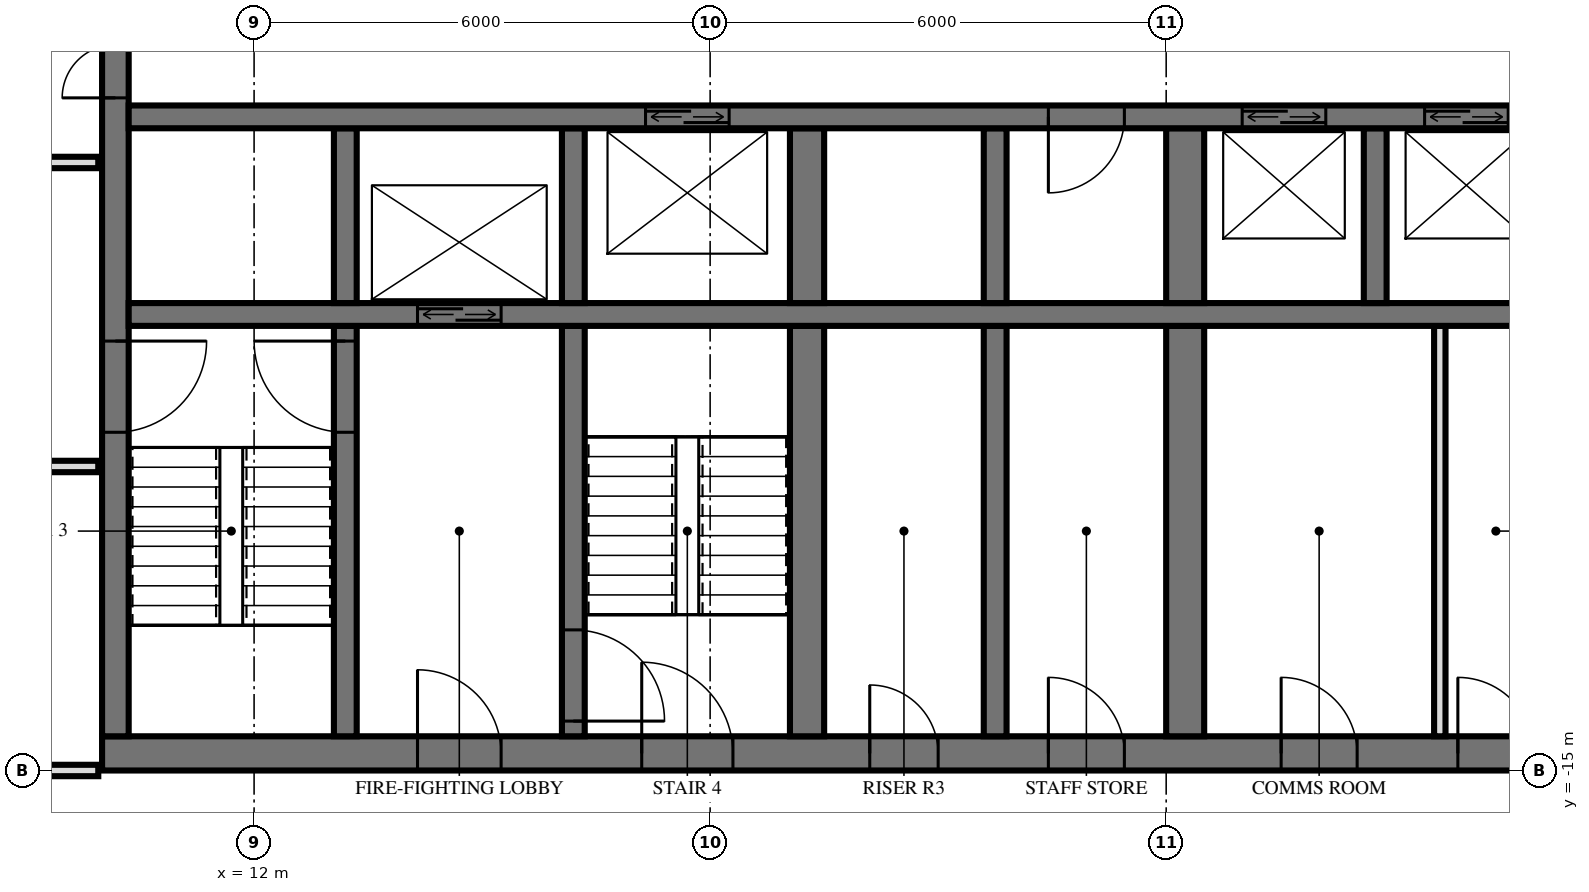
"""IFC4 building model, lengths in metres.
Left out: names, types, materials, properties, quantities, classifications, styles, units other than length and angle.
Written with IfcOpenShell. Run it as: python <this file> out.ifc"""

import sys

from ifc_helpers import new_model, si_unit, direction, frame, frame_2d, origin, place, context, subcontext, project, spatial, rectangle, extrude, element, fill, save


model = new_model("IFC4")
c1 = context("Model", 3, precision=1e-05, world=origin(), true_north=direction((0.0, 1.0)))
c2 = subcontext(c1, "Body", "Model", "MODEL_VIEW")
j1 = project(units=[si_unit("LENGTHUNIT", "METRE"), si_unit("PLANEANGLEUNIT", "RADIAN")], contexts=[c1])
p1 = place(None, origin())
s1 = spatial("IfcSite", under=j1, at=p1, CompositionType="ELEMENT")
p2 = place(p1, origin())
s2 = spatial("IfcBuilding", under=s1, at=p2, CompositionType="ELEMENT")
p3 = place(p2, frame((0.0, 0.0, 81.6)))
s3 = spatial("IfcBuildingStorey", under=s2, at=p3, CompositionType="ELEMENT", Elevation=81.6)
p4 = place(p3, frame((10.0, -14.775, 0.0), z_axis=(0.0, 0.0, 1.0), x_axis=(1.0, 0.0, 0.0)))
e1 = element("IfcWall", 1, at=p4, inside=s3, PredefinedType="SHEAR", context=c2, shape_type="SweptSolid", body=[
    extrude(rectangle(XDim=19.5, YDim=0.45, at=frame_2d((9.75, 0.0))), origin(), (0.0, 0.0, 1.0), 3.6),
])
p5 = place(p4, frame((7.1, 0.0, 0.0)))
e2 = element("IfcOpeningElement", 2, at=p5, cuts=e1, PredefinedType="OPENING", context=c2, shape_type="SweptSolid", body=[
    extrude(rectangle(XDim=1.2, YDim=2.1, at=frame_2d((0.6, 1.05))), frame((0.0, 0.235, 0.0), z_axis=(0.0, -1.0, 0.0), x_axis=(1.0, 0.0, 0.0)), (0.0, 0.0, 1.0), 0.47),
])
p6 = place(p4, frame((4.15, 0.0, 0.0)))
e3 = element("IfcOpeningElement", 3, at=p6, cuts=e1, PredefinedType="OPENING", context=c2, shape_type="SweptSolid", body=[
    extrude(rectangle(XDim=1.1, YDim=2.1, at=frame_2d((0.55, 1.05))), frame((0.0, 0.235, 0.0), z_axis=(0.0, -1.0, 0.0), x_axis=(1.0, 0.0, 0.0)), (0.0, 0.0, 1.0), 0.47),
])
p7 = place(p4, frame((10.1, 0.0, 0.0)))
e4 = element("IfcOpeningElement", 4, at=p7, cuts=e1, PredefinedType="OPENING", context=c2, shape_type="SweptSolid", body=[
    extrude(rectangle(XDim=0.9, YDim=2.1, at=frame_2d((0.45, 1.05))), frame((0.0, 0.235, 0.0), z_axis=(0.0, -1.0, 0.0), x_axis=(1.0, 0.0, 0.0)), (0.0, 0.0, 1.0), 0.47),
])
p8 = place(p4, frame((12.45, 0.0, 0.0)))
e5 = element("IfcOpeningElement", 5, at=p8, cuts=e1, PredefinedType="OPENING", context=c2, shape_type="SweptSolid", body=[
    extrude(rectangle(XDim=1.0, YDim=2.1, at=frame_2d((0.5, 1.05))), frame((0.0, 0.235, 0.0), z_axis=(0.0, -1.0, 0.0), x_axis=(1.0, 0.0, 0.0)), (0.0, 0.0, 1.0), 0.47),
])
p9 = place(p4, frame((15.512, 0.0, 0.0)))
e6 = element("IfcOpeningElement", 6, at=p9, cuts=e1, PredefinedType="OPENING", context=c2, shape_type="SweptSolid", body=[
    extrude(rectangle(XDim=1.0, YDim=2.1, at=frame_2d((0.5, 1.05))), frame((0.0, 0.235, 0.0), z_axis=(0.0, -1.0, 0.0), x_axis=(1.0, 0.0, 0.0)), (0.0, 0.0, 1.0), 0.47),
])
p10 = place(p4, frame((17.837, 0.0, 0.0)))
e7 = element("IfcOpeningElement", 7, at=p10, cuts=e1, PredefinedType="OPENING", context=c2, shape_type="SweptSolid", body=[
    extrude(rectangle(XDim=1.0, YDim=2.1, at=frame_2d((0.5, 1.05))), frame((0.0, 0.235, 0.0), z_axis=(0.0, -1.0, 0.0), x_axis=(1.0, 0.0, 0.0)), (0.0, 0.0, 1.0), 0.47),
])
p11 = place(p3, frame((10.175, -14.55, 0.0), z_axis=(0.0, 0.0, 1.0), x_axis=(0.0, 1.0, 0.0)))
e8 = element("IfcWall", 8, at=p11, inside=s3, PredefinedType="SHEAR", context=c2, shape_type="SweptSolid", body=[
    extrude(rectangle(XDim=14.1, YDim=0.35, at=frame_2d((7.05, 0.0))), origin(), (0.0, 0.0, 1.0), 3.6),
])
p12 = place(p11, frame((8.4, 0.0, 0.0)))
e9 = element("IfcOpeningElement", 9, at=p12, cuts=e8, PredefinedType="OPENING", context=c2, shape_type="SweptSolid", body=[
    extrude(rectangle(XDim=1.4, YDim=2.4, at=frame_2d((0.7, 1.2))), frame((0.0, 0.185, 0.0), z_axis=(0.0, -1.0, 0.0), x_axis=(1.0, 0.0, 0.0)), (0.0, 0.0, 1.0), 0.37),
])
p13 = place(p11, frame((10.0, 0.0, 0.0)))
e10 = element("IfcOpeningElement", 10, at=p13, cuts=e8, PredefinedType="OPENING", context=c2, shape_type="SweptSolid", body=[
    extrude(rectangle(XDim=1.4, YDim=2.4, at=frame_2d((0.7, 1.2))), frame((0.0, 0.185, 0.0), z_axis=(0.0, -1.0, 0.0), x_axis=(1.0, 0.0, 0.0)), (0.0, 0.0, 1.0), 0.37),
])
p14 = place(p11, frame((4.0, 0.0, 0.0)))
e11 = element("IfcOpeningElement", 11, at=p14, cuts=e8, PredefinedType="OPENING", context=c2, shape_type="SweptSolid", body=[
    extrude(rectangle(XDim=1.2, YDim=2.1, at=frame_2d((0.6, 1.05))), frame((0.0, 0.185, 0.0), z_axis=(0.0, -1.0, 0.0), x_axis=(1.0, 0.0, 0.0)), (0.0, 0.0, 1.0), 0.37),
])
p15 = place(p3, frame((10.35, -6.4, 0.0), z_axis=(0.0, 0.0, 1.0), x_axis=(1.0, 0.0, 0.0)))
e12 = element("IfcWall", 12, at=p15, inside=s3, PredefinedType="SHEAR", context=c2, shape_type="SweptSolid", body=[
    extrude(rectangle(XDim=18.7, YDim=0.3, at=frame_2d((9.35, 0.0))), origin(), (0.0, 0.0, 1.0), 3.6),
])
p16 = place(p15, frame((14.65, 0.0, 0.0)))
e13 = element("IfcOpeningElement", 13, at=p16, cuts=e12, PredefinedType="OPENING", context=c2, shape_type="SweptSolid", body=[
    extrude(rectangle(XDim=1.1, YDim=2.1, at=frame_2d((0.55, 1.05))), frame((0.0, 0.16, 0.0), z_axis=(0.0, -1.0, 0.0), x_axis=(1.0, 0.0, 0.0)), (0.0, 0.0, 1.0), 0.32),
])
p17 = place(p15, frame((17.05, 0.0, 0.0)))
e14 = element("IfcOpeningElement", 14, at=p17, cuts=e12, PredefinedType="OPENING", context=c2, shape_type="SweptSolid", body=[
    extrude(rectangle(XDim=1.1, YDim=2.1, at=frame_2d((0.55, 1.05))), frame((0.0, 0.16, 0.0), z_axis=(0.0, -1.0, 0.0), x_axis=(1.0, 0.0, 0.0)), (0.0, 0.0, 1.0), 0.32),
])
p18 = place(p15, frame((6.8, 0.0, 0.0)))
e15 = element("IfcOpeningElement", 15, at=p18, cuts=e12, PredefinedType="OPENING", context=c2, shape_type="SweptSolid", body=[
    extrude(rectangle(XDim=1.1, YDim=2.1, at=frame_2d((0.55, 1.05))), frame((0.0, 0.16, 0.0), z_axis=(0.0, -1.0, 0.0), x_axis=(1.0, 0.0, 0.0)), (0.0, 0.0, 1.0), 0.32),
])
p19 = place(p15, frame((12.1, 0.0, 0.0)))
e16 = element("IfcOpeningElement", 16, at=p19, cuts=e12, PredefinedType="OPENING", context=c2, shape_type="SweptSolid", body=[
    extrude(rectangle(XDim=1.0, YDim=2.1, at=frame_2d((0.5, 1.05))), frame((0.0, 0.16, 0.0), z_axis=(0.0, -1.0, 0.0), x_axis=(1.0, 0.0, 0.0)), (0.0, 0.0, 1.0), 0.32),
])
p20 = place(p3, frame((10.35, -9.0, 0.0), z_axis=(0.0, 0.0, 1.0), x_axis=(1.0, 0.0, 0.0)))
e17 = element("IfcWall", 17, at=p20, inside=s3, PredefinedType="SHEAR", context=c2, shape_type="SweptSolid", body=[
    extrude(rectangle(XDim=18.7, YDim=0.3, at=frame_2d((9.35, 0.0))), origin(), (0.0, 0.0, 1.0), 3.6),
])
p21 = place(p20, frame((3.8, 0.0, 0.0)))
e18 = element("IfcOpeningElement", 18, at=p21, cuts=e17, PredefinedType="OPENING", context=c2, shape_type="SweptSolid", body=[
    extrude(rectangle(XDim=1.1, YDim=2.1, at=frame_2d((0.55, 1.05))), frame((0.0, 0.16, 0.0), z_axis=(0.0, -1.0, 0.0), x_axis=(1.0, 0.0, 0.0)), (0.0, 0.0, 1.0), 0.32),
])
p22 = place(p3, frame((13.2, -8.85, 0.0), z_axis=(0.0, 0.0, 1.0), x_axis=(0.0, 1.0, 0.0)))
e19 = element("IfcWall", 19, at=p22, inside=s3, PredefinedType="SHEAR", context=c2, shape_type="SweptSolid", body=[
    extrude(rectangle(XDim=2.3, YDim=0.3, at=frame_2d((1.15, 0.0))), origin(), (0.0, 0.0, 1.0), 3.6),
])
p23 = place(p3, frame((13.2, -14.55, 0.0), z_axis=(0.0, 0.0, 1.0), x_axis=(0.0, 1.0, 0.0)))
e20 = element("IfcWall", 20, at=p23, inside=s3, PredefinedType="SHEAR", context=c2, shape_type="SweptSolid", body=[
    extrude(rectangle(XDim=5.4, YDim=0.3, at=frame_2d((2.7, 0.0))), origin(), (0.0, 0.0, 1.0), 3.6),
])
p24 = place(p23, frame((4.0, 0.0, 0.0)))
e21 = element("IfcOpeningElement", 21, at=p24, cuts=e20, PredefinedType="OPENING", context=c2, shape_type="SweptSolid", body=[
    extrude(rectangle(XDim=1.2, YDim=2.1, at=frame_2d((0.6, 1.05))), frame((0.0, 0.16, 0.0), z_axis=(0.0, -1.0, 0.0), x_axis=(1.0, 0.0, 0.0)), (0.0, 0.0, 1.0), 0.32),
])
p25 = place(p3, frame((16.2, -8.85, 0.0), z_axis=(0.0, 0.0, 1.0), x_axis=(0.0, 1.0, 0.0)))
e22 = element("IfcWall", 22, at=p25, inside=s3, PredefinedType="SHEAR", context=c2, shape_type="SweptSolid", body=[
    extrude(rectangle(XDim=2.3, YDim=0.3, at=frame_2d((1.15, 0.0))), origin(), (0.0, 0.0, 1.0), 3.6),
])
p26 = place(p3, frame((16.2, -14.55, 0.0), z_axis=(0.0, 0.0, 1.0), x_axis=(0.0, 1.0, 0.0)))
e23 = element("IfcWall", 23, at=p26, inside=s3, PredefinedType="SHEAR", context=c2, shape_type="SweptSolid", body=[
    extrude(rectangle(XDim=5.4, YDim=0.3, at=frame_2d((2.7, 0.0))), origin(), (0.0, 0.0, 1.0), 3.6),
])
p27 = place(p26, frame((0.2, 0.0, 0.0)))
e24 = element("IfcOpeningElement", 24, at=p27, cuts=e23, PredefinedType="OPENING", context=c2, shape_type="SweptSolid", body=[
    extrude(rectangle(XDim=1.2, YDim=2.1, at=frame_2d((0.6, 1.05))), frame((0.0, 0.16, 0.0), z_axis=(0.0, -1.0, 0.0), x_axis=(1.0, 0.0, 0.0)), (0.0, 0.0, 1.0), 0.32),
])
p28 = place(p3, frame((19.275, -8.85, 0.0), z_axis=(0.0, 0.0, 1.0), x_axis=(0.0, 1.0, 0.0)))
e25 = element("IfcWall", 25, at=p28, inside=s3, PredefinedType="SHEAR", context=c2, shape_type="SweptSolid", body=[
    extrude(rectangle(XDim=2.3, YDim=0.45, at=frame_2d((1.15, 0.0))), origin(), (0.0, 0.0, 1.0), 3.6),
])
p29 = place(p3, frame((19.275, -14.55, 0.0), z_axis=(0.0, 0.0, 1.0), x_axis=(0.0, 1.0, 0.0)))
e26 = element("IfcWall", 26, at=p29, inside=s3, PredefinedType="SHEAR", context=c2, shape_type="SweptSolid", body=[
    extrude(rectangle(XDim=5.4, YDim=0.45, at=frame_2d((2.7, 0.0))), origin(), (0.0, 0.0, 1.0), 3.6),
])
p30 = place(p3, frame((21.75, -8.85, 0.0), z_axis=(0.0, 0.0, 1.0), x_axis=(0.0, 1.0, 0.0)))
e27 = element("IfcWall", 27, at=p30, inside=s3, PredefinedType="SHEAR", context=c2, shape_type="SweptSolid", body=[
    extrude(rectangle(XDim=2.3, YDim=0.3, at=frame_2d((1.15, 0.0))), origin(), (0.0, 0.0, 1.0), 3.6),
])
p31 = place(p3, frame((21.75, -14.55, 0.0), z_axis=(0.0, 0.0, 1.0), x_axis=(0.0, 1.0, 0.0)))
e28 = element("IfcWall", 28, at=p31, inside=s3, PredefinedType="SHEAR", context=c2, shape_type="SweptSolid", body=[
    extrude(rectangle(XDim=5.4, YDim=0.3, at=frame_2d((2.7, 0.0))), origin(), (0.0, 0.0, 1.0), 3.6),
])
p32 = place(p3, frame((24.25, -8.85, 0.0), z_axis=(0.0, 0.0, 1.0), x_axis=(0.0, 1.0, 0.0)))
e29 = element("IfcWall", 29, at=p32, inside=s3, PredefinedType="SHEAR", context=c2, shape_type="SweptSolid", body=[
    extrude(rectangle(XDim=2.3, YDim=0.5, at=frame_2d((1.15, 0.0))), origin(), (0.0, 0.0, 1.0), 3.6),
])
p33 = place(p3, frame((24.25, -14.55, 0.0), z_axis=(0.0, 0.0, 1.0), x_axis=(0.0, 1.0, 0.0)))
e30 = element("IfcWall", 30, at=p33, inside=s3, PredefinedType="SHEAR", context=c2, shape_type="SweptSolid", body=[
    extrude(rectangle(XDim=5.4, YDim=0.5, at=frame_2d((2.7, 0.0))), origin(), (0.0, 0.0, 1.0), 3.6),
])
p34 = place(p3, frame((26.75, -8.85, 0.0), z_axis=(0.0, 0.0, 1.0), x_axis=(0.0, 1.0, 0.0)))
e31 = element("IfcWall", 31, at=p34, inside=s3, PredefinedType="SHEAR", context=c2, shape_type="SweptSolid", body=[
    extrude(rectangle(XDim=2.3, YDim=0.3, at=frame_2d((1.15, 0.0))), origin(), (0.0, 0.0, 1.0), 3.6),
])
p35 = place(p3, frame((27.6, -14.55, 0.0), z_axis=(0.0, 0.0, 1.0), x_axis=(0.0, 1.0, 0.0)))
e32 = element("IfcWall", 32, at=p35, inside=s3, PredefinedType="PARTITIONING", context=c2, shape_type="SweptSolid", body=[
    extrude(rectangle(XDim=5.4, YDim=0.15, at=frame_2d((2.7, 0.0))), origin(), (0.0, 0.0, 1.0), 3.3),
])
p36 = place(p3, frame((-9.95, -15.0, 0.0), z_axis=(0.0, 0.0, 1.0), x_axis=(1.0, 0.0, 0.0)))
e33 = element("IfcWall", 33, at=p36, inside=s3, PredefinedType="PARTITIONING", context=c2, shape_type="SweptSolid", body=[
    extrude(rectangle(XDim=19.9, YDim=0.15, at=frame_2d((9.95, 0.0))), origin(), (0.0, 0.0, 1.0), 2.684),
])
p37 = place(p36, frame((9.45, 0.0, 0.0)))
e34 = element("IfcOpeningElement", 34, at=p37, cuts=e33, PredefinedType="OPENING", context=c2, shape_type="SweptSolid", body=[
    extrude(rectangle(XDim=1.0, YDim=2.1, at=frame_2d((0.5, 1.05))), frame((0.0, 0.085, 0.0), z_axis=(0.0, -1.0, 0.0), x_axis=(1.0, 0.0, 0.0)), (0.0, 0.0, 1.0), 0.17),
])
p38 = place(p3, frame((-9.95, -11.0, 0.0), z_axis=(0.0, 0.0, 1.0), x_axis=(1.0, 0.0, 0.0)))
e35 = element("IfcWall", 35, at=p38, inside=s3, PredefinedType="PARTITIONING", context=c2, shape_type="SweptSolid", body=[
    extrude(rectangle(XDim=19.9, YDim=0.15, at=frame_2d((9.95, 0.0))), origin(), (0.0, 0.0, 1.0), 3.32),
])
p39 = place(p38, frame((9.45, 0.0, 0.0)))
e36 = element("IfcOpeningElement", 36, at=p39, cuts=e35, PredefinedType="OPENING", context=c2, shape_type="SweptSolid", body=[
    extrude(rectangle(XDim=1.0, YDim=2.1, at=frame_2d((0.5, 1.05))), frame((0.0, 0.085, 0.0), z_axis=(0.0, -1.0, 0.0), x_axis=(1.0, 0.0, 0.0)), (0.0, 0.0, 1.0), 0.17),
])
p40 = place(p38, frame((3.45, 0.0, 0.0)))
e37 = element("IfcOpeningElement", 37, at=p40, cuts=e35, PredefinedType="OPENING", context=c2, shape_type="SweptSolid", body=[
    extrude(rectangle(XDim=1.0, YDim=2.1, at=frame_2d((0.5, 1.05))), frame((0.0, 0.085, 0.0), z_axis=(0.0, -1.0, 0.0), x_axis=(1.0, 0.0, 0.0)), (0.0, 0.0, 1.0), 0.17),
])
p41 = place(p3, frame((-9.95, -7.0, 0.0), z_axis=(0.0, 0.0, 1.0), x_axis=(1.0, 0.0, 0.0)))
e38 = element("IfcWall", 38, at=p41, inside=s3, PredefinedType="PARTITIONING", context=c2, shape_type="SweptSolid", body=[
    extrude(rectangle(XDim=19.9, YDim=0.15, at=frame_2d((9.95, 0.0))), origin(), (0.0, 0.0, 1.0), 3.32),
])
p42 = place(p41, frame((9.45, 0.0, 0.0)))
e39 = element("IfcOpeningElement", 39, at=p42, cuts=e38, PredefinedType="OPENING", context=c2, shape_type="SweptSolid", body=[
    extrude(rectangle(XDim=1.0, YDim=2.1, at=frame_2d((0.5, 1.05))), frame((0.0, 0.085, 0.0), z_axis=(0.0, -1.0, 0.0), x_axis=(1.0, 0.0, 0.0)), (0.0, 0.0, 1.0), 0.17),
])
p43 = place(p41, frame((15.45, 0.0, 0.0)))
e40 = element("IfcOpeningElement", 40, at=p43, cuts=e38, PredefinedType="OPENING", context=c2, shape_type="SweptSolid", body=[
    extrude(rectangle(XDim=1.0, YDim=2.1, at=frame_2d((0.5, 1.05))), frame((0.0, 0.085, 0.0), z_axis=(0.0, -1.0, 0.0), x_axis=(1.0, 0.0, 0.0)), (0.0, 0.0, 1.0), 0.17),
])
p44 = place(p16, origin())
e41 = element("IfcDoor", 41, at=p44, inside=s3, OperationType="DOUBLE_DOOR_SLIDING", PredefinedType="USERDEFINED", context=c2, shape_type="SweptSolid", body=[
    extrude(rectangle(XDim=1.1, YDim=2.1, at=frame_2d((0.55, 1.05))), frame((0.0, 0.025, 0.0), z_axis=(0.0, -1.0, 0.0), x_axis=(1.0, 0.0, 0.0)), (0.0, 0.0, 1.0), 0.05),
])
fill(e13, e41)
p45 = place(p17, origin())
e42 = element("IfcDoor", 42, at=p45, inside=s3, OperationType="DOUBLE_DOOR_SLIDING", PredefinedType="USERDEFINED", context=c2, shape_type="SweptSolid", body=[
    extrude(rectangle(XDim=1.1, YDim=2.1, at=frame_2d((0.55, 1.05))), frame((0.0, 0.025, 0.0), z_axis=(0.0, -1.0, 0.0), x_axis=(1.0, 0.0, 0.0)), (0.0, 0.0, 1.0), 0.05),
])
fill(e14, e42)
p46 = place(p21, origin())
e43 = element("IfcDoor", 43, at=p46, inside=s3, OperationType="DOUBLE_DOOR_SLIDING", PredefinedType="USERDEFINED", context=c2, shape_type="SweptSolid", body=[
    extrude(rectangle(XDim=1.1, YDim=2.1, at=frame_2d((0.55, 1.05))), frame((0.0, 0.025, 0.0), z_axis=(0.0, -1.0, 0.0), x_axis=(1.0, 0.0, 0.0)), (0.0, 0.0, 1.0), 0.05),
])
fill(e18, e43)
p47 = place(p18, origin())
e44 = element("IfcDoor", 44, at=p47, inside=s3, OperationType="DOUBLE_DOOR_SLIDING", PredefinedType="USERDEFINED", context=c2, shape_type="SweptSolid", body=[
    extrude(rectangle(XDim=1.1, YDim=2.1, at=frame_2d((0.55, 1.05))), frame((0.0, 0.025, 0.0), z_axis=(0.0, -1.0, 0.0), x_axis=(1.0, 0.0, 0.0)), (0.0, 0.0, 1.0), 0.05),
])
fill(e15, e44)
p48 = place(p12, origin())
e45 = element("IfcDoor", 45, at=p48, inside=s3, OperationType="DOUBLE_DOOR_SINGLE_SWING", PredefinedType="DOOR", context=c2, shape_type="SweptSolid", body=[
    extrude(rectangle(XDim=1.4, YDim=2.4, at=frame_2d((0.7, 1.2))), frame((0.0, 0.025, 0.0), z_axis=(0.0, -1.0, 0.0), x_axis=(1.0, 0.0, 0.0)), (0.0, 0.0, 1.0), 0.05),
])
fill(e9, e45)
p49 = place(p14, frame((0.6, 0.0, 0.0), z_axis=(0.0, 0.0, 1.0), x_axis=(-1.0, 0.0, 0.0)))
e46 = element("IfcDoor", 46, at=p49, inside=s3, OperationType="SINGLE_SWING_RIGHT", PredefinedType="DOOR", context=c2, shape_type="SweptSolid", body=[
    extrude(rectangle(XDim=1.2, YDim=2.1, at=frame_2d((0.0, 1.05))), frame((0.0, -0.025, 0.0), z_axis=(0.0, 1.0, 0.0), x_axis=(-1.0, 0.0, 0.0)), (0.0, 0.0, 1.0), 0.05),
])
fill(e11, e46)
p50 = place(p5, origin())
e47 = element("IfcDoor", 47, at=p50, inside=s3, OperationType="SINGLE_SWING_RIGHT", PredefinedType="DOOR", context=c2, shape_type="SweptSolid", body=[
    extrude(rectangle(XDim=1.2, YDim=2.1, at=frame_2d((0.6, 1.05))), frame((0.0, 0.025, 0.0), z_axis=(0.0, -1.0, 0.0), x_axis=(1.0, 0.0, 0.0)), (0.0, 0.0, 1.0), 0.05),
])
fill(e2, e47)
p51 = place(p6, origin())
e48 = element("IfcDoor", 48, at=p51, inside=s3, OperationType="SINGLE_SWING_RIGHT", PredefinedType="DOOR", context=c2, shape_type="SweptSolid", body=[
    extrude(rectangle(XDim=1.1, YDim=2.1, at=frame_2d((0.55, 1.05))), frame((0.0, 0.025, 0.0), z_axis=(0.0, -1.0, 0.0), x_axis=(1.0, 0.0, 0.0)), (0.0, 0.0, 1.0), 0.05),
])
fill(e3, e48)
p52 = place(p7, origin())
e49 = element("IfcDoor", 49, at=p52, inside=s3, OperationType="SINGLE_SWING_RIGHT", PredefinedType="DOOR", context=c2, shape_type="SweptSolid", body=[
    extrude(rectangle(XDim=0.9, YDim=2.1, at=frame_2d((0.45, 1.05))), frame((0.0, 0.025, 0.0), z_axis=(0.0, -1.0, 0.0), x_axis=(1.0, 0.0, 0.0)), (0.0, 0.0, 1.0), 0.05),
])
fill(e4, e49)
p53 = place(p8, origin())
e50 = element("IfcDoor", 50, at=p53, inside=s3, OperationType="SINGLE_SWING_RIGHT", PredefinedType="DOOR", context=c2, shape_type="SweptSolid", body=[
    extrude(rectangle(XDim=1.0, YDim=2.1, at=frame_2d((0.5, 1.05))), frame((0.0, 0.025, 0.0), z_axis=(0.0, -1.0, 0.0), x_axis=(1.0, 0.0, 0.0)), (0.0, 0.0, 1.0), 0.05),
])
fill(e5, e50)
p54 = place(p9, origin())
e51 = element("IfcDoor", 51, at=p54, inside=s3, OperationType="SINGLE_SWING_RIGHT", PredefinedType="DOOR", context=c2, shape_type="SweptSolid", body=[
    extrude(rectangle(XDim=1.0, YDim=2.1, at=frame_2d((0.5, 1.05))), frame((0.0, 0.025, 0.0), z_axis=(0.0, -1.0, 0.0), x_axis=(1.0, 0.0, 0.0)), (0.0, 0.0, 1.0), 0.05),
])
fill(e6, e51)
p55 = place(p10, origin())
e52 = element("IfcDoor", 52, at=p55, inside=s3, OperationType="SINGLE_SWING_RIGHT", PredefinedType="DOOR", context=c2, shape_type="SweptSolid", body=[
    extrude(rectangle(XDim=1.0, YDim=2.1, at=frame_2d((0.5, 1.05))), frame((0.0, 0.025, 0.0), z_axis=(0.0, -1.0, 0.0), x_axis=(1.0, 0.0, 0.0)), (0.0, 0.0, 1.0), 0.05),
])
fill(e7, e52)
p56 = place(p19, frame((0.5, 0.0, 0.0), z_axis=(0.0, 0.0, 1.0), x_axis=(-1.0, 0.0, 0.0)))
e53 = element("IfcDoor", 53, at=p56, inside=s3, OperationType="SINGLE_SWING_LEFT", PredefinedType="DOOR", context=c2, shape_type="SweptSolid", body=[
    extrude(rectangle(XDim=1.0, YDim=2.1, at=frame_2d((0.0, 1.05))), frame((0.0, -0.025, 0.0), z_axis=(0.0, 1.0, 0.0), x_axis=(-1.0, 0.0, 0.0)), (0.0, 0.0, 1.0), 0.05),
])
fill(e16, e53)
p57 = place(p24, origin())
e54 = element("IfcDoor", 54, at=p57, inside=s3, OperationType="SINGLE_SWING_LEFT", PredefinedType="DOOR", context=c2, shape_type="SweptSolid", body=[
    extrude(rectangle(XDim=1.2, YDim=2.1, at=frame_2d((0.6, 1.05))), frame((0.0, 0.025, 0.0), z_axis=(0.0, -1.0, 0.0), x_axis=(1.0, 0.0, 0.0)), (0.0, 0.0, 1.0), 0.05),
])
fill(e21, e54)
p58 = place(p27, frame((0.6, 0.0, 0.0), z_axis=(0.0, 0.0, 1.0), x_axis=(-1.0, 0.0, 0.0)))
e55 = element("IfcDoor", 55, at=p58, inside=s3, OperationType="SINGLE_SWING_LEFT", PredefinedType="DOOR", context=c2, shape_type="SweptSolid", body=[
    extrude(rectangle(XDim=1.2, YDim=2.1, at=frame_2d((0.0, 1.05))), frame((0.0, -0.025, 0.0), z_axis=(0.0, 1.0, 0.0), x_axis=(-1.0, 0.0, 0.0)), (0.0, 0.0, 1.0), 0.05),
])
fill(e24, e55)
save(model, sys.argv[1])
